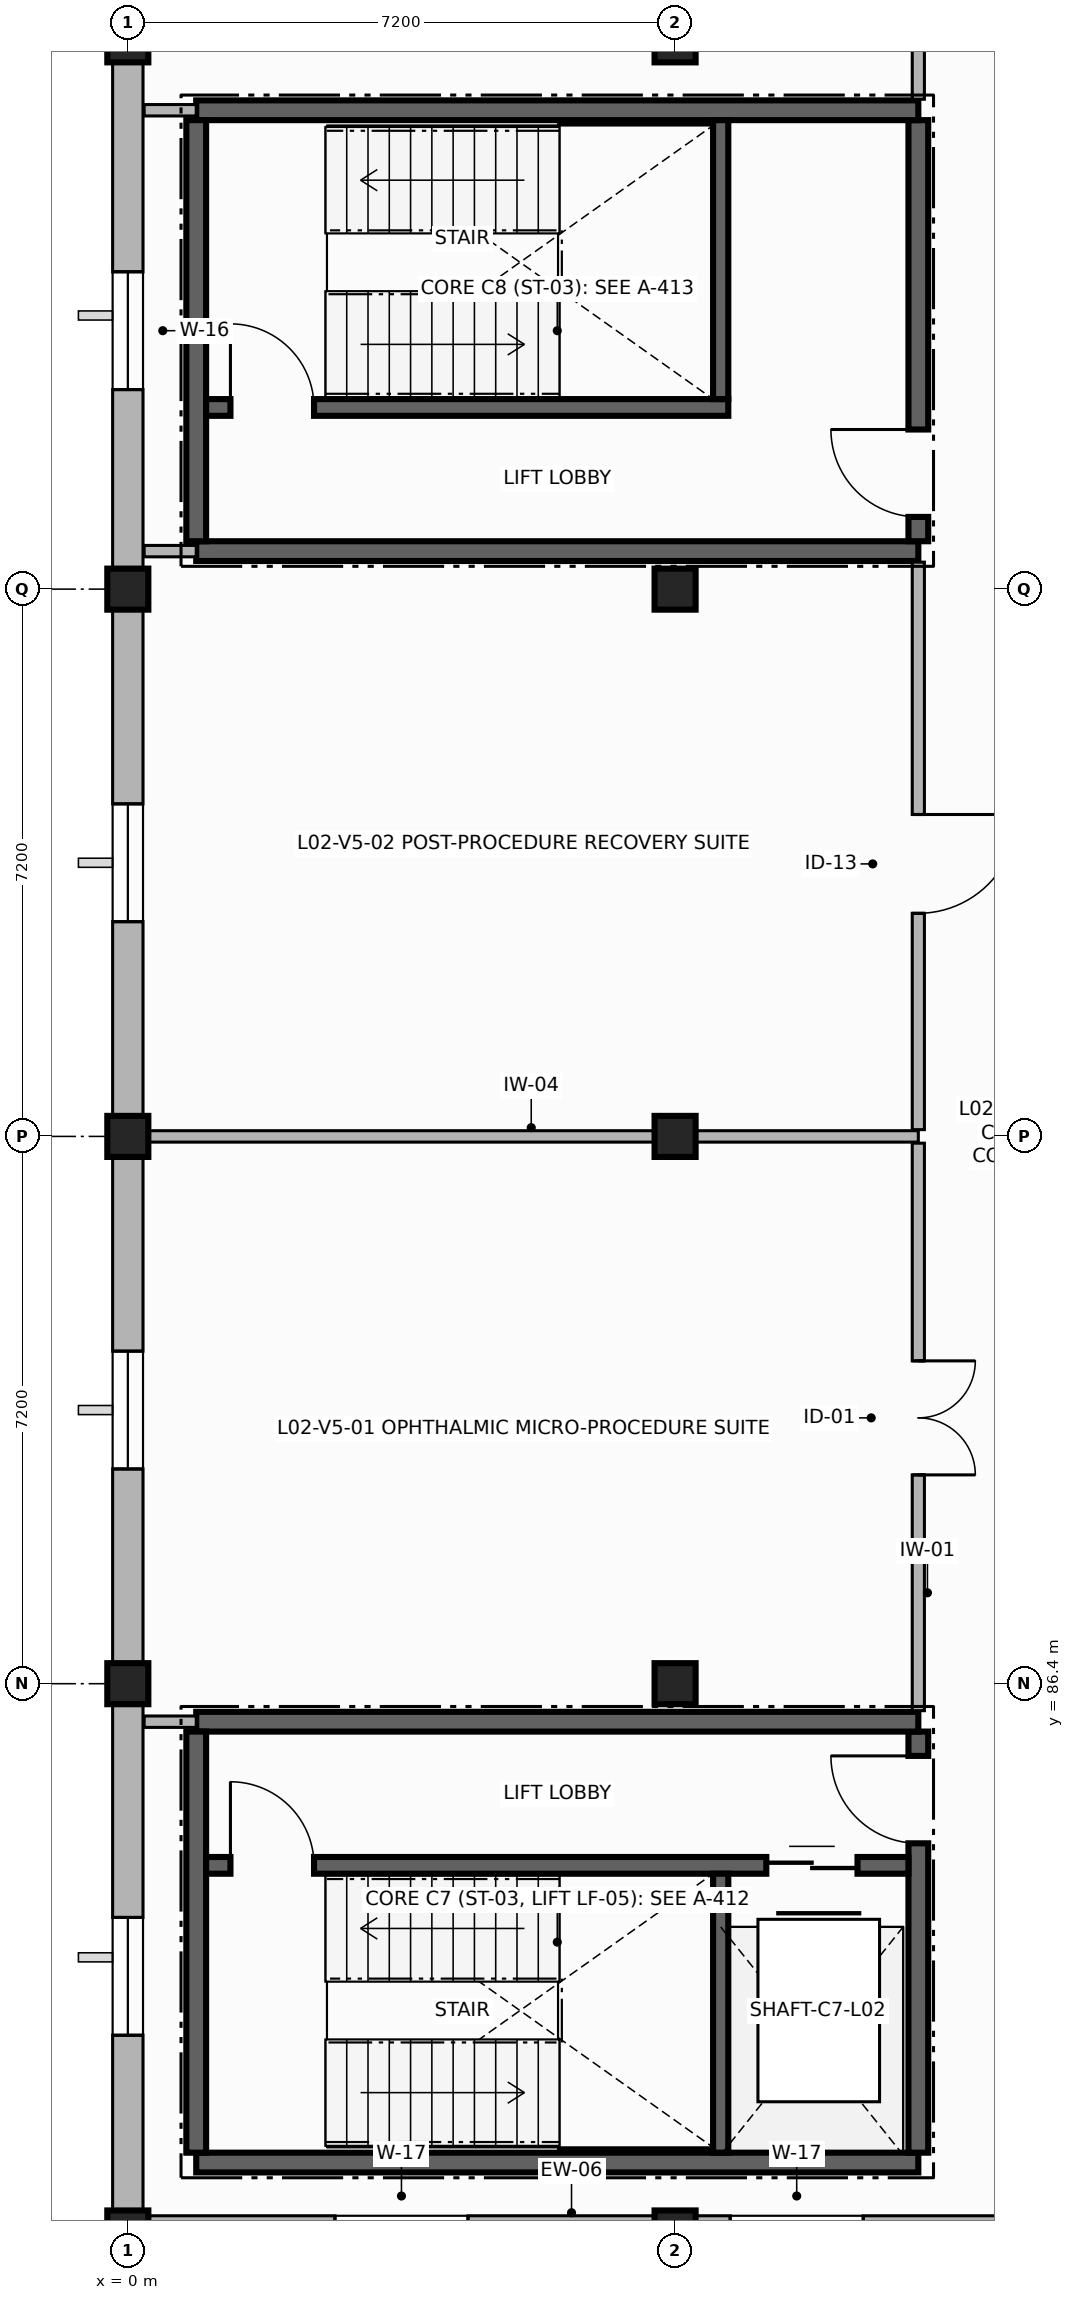
"""IFC4 building model, lengths in metres.
Left out: names, types, materials, properties, quantities, classifications, styles, units other than length and angle.
Written with IfcOpenShell. Run it as: python <this file> out.ifc"""

import sys

from ifc_helpers import new_model, si_unit, direction, frame, frame_2d, origin, origin_2d, place, context, subcontext, project, spatial, rectangle, extrude, element, fill, save


model = new_model("IFC4")
c1 = context("Model", 3, precision=1e-05, world=origin(), true_north=direction((0.0, 1.0)))
c2 = subcontext(c1, "Body", "Model", "MODEL_VIEW")
j1 = project(units=[si_unit("LENGTHUNIT", "METRE"), si_unit("PLANEANGLEUNIT", "RADIAN")], contexts=[c1])
p1 = place(None, origin())
s1 = spatial("IfcSite", under=j1, at=p1, CompositionType="ELEMENT")
p2 = place(p1, origin())
s2 = spatial("IfcBuilding", under=s1, at=p2, CompositionType="ELEMENT")
p3 = place(p2, frame((0.0, 0.0, 8.4)))
s3 = spatial("IfcBuildingStorey", under=s2, at=p3, CompositionType="ELEMENT", Elevation=8.4)
for number, where, z_axis, x_axis in (
    (1, (0.0, 79.2, 0.0), (0.0, 0.0, 1.0), (1.0, 0.0, 0.0)),
    (2, (0.0, 86.4, 0.0), (0.0, 0.0, 1.0), (1.0, 0.0, 0.0)),
    (3, (0.0, 93.6, 0.0), (0.0, 0.0, 1.0), (1.0, 0.0, 0.0)),
    (4, (0.0, 100.8, 0.0), (0.0, 0.0, 1.0), (1.0, 0.0, 0.0)),
    (5, (0.0, 108.0, 0.0), (0.0, 0.0, 1.0), (1.0, 0.0, 0.0)),
    (6, (7.2, 79.2, 0.0), (0.0, 0.0, 1.0), (1.0, 0.0, 0.0)),
    (7, (7.2, 86.4, 0.0), (0.0, 0.0, 1.0), (1.0, 0.0, 0.0)),
    (8, (7.2, 93.6, 0.0), (0.0, 0.0, 1.0), (1.0, 0.0, 0.0)),
    (9, (7.2, 100.8, 0.0), (0.0, 0.0, 1.0), (1.0, 0.0, 0.0)),
    (10, (7.2, 108.0, 0.0), (0.0, 0.0, 1.0), (1.0, 0.0, 0.0)),
):
    element("IfcColumn", number, at=place(p3, frame(where, z_axis=z_axis, x_axis=x_axis)), inside=s3, PredefinedType="COLUMN", context=c2, shape_type="SweptSolid", body=[
        extrude(rectangle(XDim=0.54, YDim=0.54, at=origin_2d()), origin(), (0.0, 0.0, 1.0), 3.59),
    ])
p4 = place(p3, frame((0.0, 79.2, 0.0), z_axis=(0.0, 0.0, 1.0), x_axis=(1.0, 0.0, 0.0)))
e11 = element("IfcWall", 11, at=p4, inside=s3, PredefinedType="SOLIDWALL", context=c2, shape_type="SweptSolid", body=[
    extrude(rectangle(XDim=7.2, YDim=0.4, at=frame_2d((3.6, 0.0))), origin(), (0.0, 0.0, 1.0), 2.92),
])
p5 = place(p4, frame((2.725, 0.0, 0.9)))
e12 = element("IfcOpeningElement", 12, at=p5, cuts=e11, PredefinedType="OPENING", context=c2, shape_type="SweptSolid", body=[
    extrude(rectangle(XDim=1.75, YDim=1.8, at=frame_2d((0.875, 0.9))), frame((0.0, 0.21, 0.0), z_axis=(0.0, -1.0, 0.0), x_axis=(1.0, 0.0, 0.0)), (0.0, 0.0, 1.0), 0.42),
])
p6 = place(p3, frame((7.2, 79.2, 0.0), z_axis=(0.0, 0.0, 1.0), x_axis=(1.0, 0.0, 0.0)))
e13 = element("IfcWall", 13, at=p6, inside=s3, PredefinedType="SOLIDWALL", context=c2, shape_type="SweptSolid", body=[
    extrude(rectangle(XDim=7.2, YDim=0.4, at=frame_2d((3.6, 0.0))), origin(), (0.0, 0.0, 1.0), 2.92),
])
p7 = place(p6, frame((0.725, 0.0, 0.9)))
e14 = element("IfcOpeningElement", 14, at=p7, cuts=e13, PredefinedType="OPENING", context=c2, shape_type="SweptSolid", body=[
    extrude(rectangle(XDim=1.75, YDim=1.8, at=frame_2d((0.875, 0.9))), frame((0.0, 0.21, 0.0), z_axis=(0.0, -1.0, 0.0), x_axis=(1.0, 0.0, 0.0)), (0.0, 0.0, 1.0), 0.42),
])
p8 = place(p3, frame((0.0, 108.0, 0.0), z_axis=(0.0, 0.0, 1.0), x_axis=(0.0, -1.0, 0.0)))
e15 = element("IfcWall", 15, at=p8, inside=s3, PredefinedType="SOLIDWALL", context=c2, shape_type="SweptSolid", body=[
    extrude(rectangle(XDim=7.2, YDim=0.4, at=frame_2d((3.6, 0.0))), origin(), (0.0, 0.0, 1.0), 2.92),
])
p9 = place(p8, frame((3.025, 0.0, 0.9)))
e16 = element("IfcOpeningElement", 16, at=p9, cuts=e15, PredefinedType="OPENING", context=c2, shape_type="SweptSolid", body=[
    extrude(rectangle(XDim=1.55, YDim=1.8, at=frame_2d((0.775, 0.9))), frame((0.0, 0.21, 0.0), z_axis=(0.0, -1.0, 0.0), x_axis=(1.0, 0.0, 0.0)), (0.0, 0.0, 1.0), 0.42),
])
p10 = place(p3, frame((0.0, 100.8, 0.0), z_axis=(0.0, 0.0, 1.0), x_axis=(0.0, -1.0, 0.0)))
e17 = element("IfcWall", 17, at=p10, inside=s3, PredefinedType="SOLIDWALL", context=c2, shape_type="SweptSolid", body=[
    extrude(rectangle(XDim=7.2, YDim=0.4, at=frame_2d((3.6, 0.0))), origin(), (0.0, 0.0, 1.0), 2.92),
])
p11 = place(p10, frame((2.825, 0.0, 0.9)))
e18 = element("IfcOpeningElement", 18, at=p11, cuts=e17, PredefinedType="OPENING", context=c2, shape_type="SweptSolid", body=[
    extrude(rectangle(XDim=1.55, YDim=1.8, at=frame_2d((0.775, 0.9))), frame((0.0, 0.21, 0.0), z_axis=(0.0, -1.0, 0.0), x_axis=(1.0, 0.0, 0.0)), (0.0, 0.0, 1.0), 0.42),
])
p12 = place(p3, frame((0.0, 93.6, 0.0), z_axis=(0.0, 0.0, 1.0), x_axis=(0.0, -1.0, 0.0)))
e19 = element("IfcWall", 19, at=p12, inside=s3, PredefinedType="SOLIDWALL", context=c2, shape_type="SweptSolid", body=[
    extrude(rectangle(XDim=7.2, YDim=0.4, at=frame_2d((3.6, 0.0))), origin(), (0.0, 0.0, 1.0), 2.92),
])
p13 = place(p12, frame((2.825, 0.0, 0.9)))
e20 = element("IfcOpeningElement", 20, at=p13, cuts=e19, PredefinedType="OPENING", context=c2, shape_type="SweptSolid", body=[
    extrude(rectangle(XDim=1.55, YDim=1.8, at=frame_2d((0.775, 0.9))), frame((0.0, 0.21, 0.0), z_axis=(0.0, -1.0, 0.0), x_axis=(1.0, 0.0, 0.0)), (0.0, 0.0, 1.0), 0.42),
])
p14 = place(p3, frame((0.0, 86.4, 0.0), z_axis=(0.0, 0.0, 1.0), x_axis=(0.0, -1.0, 0.0)))
e21 = element("IfcWall", 21, at=p14, inside=s3, PredefinedType="SOLIDWALL", context=c2, shape_type="SweptSolid", body=[
    extrude(rectangle(XDim=7.2, YDim=0.4, at=frame_2d((3.6, 0.0))), origin(), (0.0, 0.0, 1.0), 2.92),
])
p15 = place(p14, frame((3.075, 0.0, 0.9)))
e22 = element("IfcOpeningElement", 22, at=p15, cuts=e21, PredefinedType="OPENING", context=c2, shape_type="SweptSolid", body=[
    extrude(rectangle(XDim=1.55, YDim=1.8, at=frame_2d((0.775, 0.9))), frame((0.0, 0.21, 0.0), z_axis=(0.0, -1.0, 0.0), x_axis=(1.0, 0.0, 0.0)), (0.0, 0.0, 1.0), 0.42),
])
p16 = place(p3, frame((0.9, 80.1, 0.0), z_axis=(0.0, 0.0, 1.0), x_axis=(1.0, 0.0, 0.0)))
e23 = element("IfcWall", 23, at=p16, inside=s3, PredefinedType="SHEAR", context=c2, shape_type="SweptSolid", body=[
    extrude(rectangle(XDim=9.5, YDim=0.26, at=frame_2d((4.75, 0.0))), origin(), (0.0, 0.0, 1.0), 3.59),
])
p17 = place(p3, frame((10.4, 80.23, 0.0), z_axis=(0.0, 0.0, 1.0), x_axis=(0.0, 1.0, 0.0)))
e24 = element("IfcWall", 24, at=p17, inside=s3, PredefinedType="SHEAR", context=c2, shape_type="SweptSolid", body=[
    extrude(rectangle(XDim=5.54, YDim=0.26, at=frame_2d((2.77, 0.0))), origin(), (0.0, 0.0, 1.0), 3.59),
])
p18 = place(p17, frame((4.07, 0.0, 0.0)))
e25 = element("IfcOpeningElement", 25, at=p18, cuts=e24, PredefinedType="OPENING", context=c2, shape_type="SweptSolid", body=[
    extrude(rectangle(XDim=1.15, YDim=2.2, at=frame_2d((0.575, 1.1))), frame((0.0, 0.14, 0.0), z_axis=(0.0, -1.0, 0.0), x_axis=(1.0, 0.0, 0.0)), (0.0, 0.0, 1.0), 0.28),
])
p19 = place(p3, frame((10.4, 85.9, 0.0), z_axis=(0.0, 0.0, 1.0), x_axis=(-1.0, 0.0, 0.0)))
e26 = element("IfcWall", 26, at=p19, inside=s3, PredefinedType="SHEAR", context=c2, shape_type="SweptSolid", body=[
    extrude(rectangle(XDim=9.5, YDim=0.26, at=frame_2d((4.75, 0.0))), origin(), (0.0, 0.0, 1.0), 3.59),
])
p20 = place(p3, frame((0.9, 85.77, 0.0), z_axis=(0.0, 0.0, 1.0), x_axis=(0.0, -1.0, 0.0)))
e27 = element("IfcWall", 27, at=p20, inside=s3, PredefinedType="SHEAR", context=c2, shape_type="SweptSolid", body=[
    extrude(rectangle(XDim=5.54, YDim=0.26, at=frame_2d((2.77, 0.0))), origin(), (0.0, 0.0, 1.0), 3.59),
])
p21 = place(p3, frame((1.03, 84.01, 0.0), z_axis=(0.0, 0.0, 1.0), x_axis=(1.0, 0.0, 0.0)))
e28 = element("IfcWall", 28, at=p21, inside=s3, PredefinedType="SHEAR", context=c2, shape_type="SweptSolid", body=[
    extrude(rectangle(XDim=9.24, YDim=0.22, at=frame_2d((4.62, 0.0))), origin(), (0.0, 0.0, 1.0), 3.59),
])
p22 = place(p21, frame((0.32, 0.0, 0.0)))
e29 = element("IfcOpeningElement", 29, at=p22, cuts=e28, PredefinedType="OPENING", context=c2, shape_type="SweptSolid", body=[
    extrude(rectangle(XDim=1.1, YDim=2.15, at=frame_2d((0.55, 1.075))), frame((0.0, 0.12, 0.0), z_axis=(0.0, -1.0, 0.0), x_axis=(1.0, 0.0, 0.0)), (0.0, 0.0, 1.0), 0.24),
])
p23 = place(p21, frame((7.37, 0.0, 0.0)))
e30 = element("IfcOpeningElement", 30, at=p23, cuts=e28, PredefinedType="OPENING", context=c2, shape_type="SweptSolid", body=[
    extrude(rectangle(XDim=1.2, YDim=2.2, at=frame_2d((0.6, 1.1))), frame((0.0, 0.12, 0.0), z_axis=(0.0, -1.0, 0.0), x_axis=(1.0, 0.0, 0.0)), (0.0, 0.0, 1.0), 0.24),
])
p24 = place(p3, frame((7.8, 80.23, 0.0), z_axis=(0.0, 0.0, 1.0), x_axis=(0.0, 1.0, 0.0)))
e31 = element("IfcWall", 31, at=p24, inside=s3, PredefinedType="SHEAR", context=c2, shape_type="SweptSolid", body=[
    extrude(rectangle(XDim=3.67, YDim=0.2, at=frame_2d((1.835, 0.0))), origin(), (0.0, 0.0, 1.0), 3.59),
])
p25 = place(p3, frame((0.9, 101.3, 0.0), z_axis=(0.0, 0.0, 1.0), x_axis=(1.0, 0.0, 0.0)))
e32 = element("IfcWall", 32, at=p25, inside=s3, PredefinedType="SHEAR", context=c2, shape_type="SweptSolid", body=[
    extrude(rectangle(XDim=9.5, YDim=0.26, at=frame_2d((4.75, 0.0))), origin(), (0.0, 0.0, 1.0), 3.59),
])
p26 = place(p3, frame((10.4, 101.43, 0.0), z_axis=(0.0, 0.0, 1.0), x_axis=(0.0, 1.0, 0.0)))
e33 = element("IfcWall", 33, at=p26, inside=s3, PredefinedType="SHEAR", context=c2, shape_type="SweptSolid", body=[
    extrude(rectangle(XDim=5.54, YDim=0.26, at=frame_2d((2.77, 0.0))), origin(), (0.0, 0.0, 1.0), 3.59),
])
p27 = place(p26, frame((0.32, 0.0, 0.0)))
e34 = element("IfcOpeningElement", 34, at=p27, cuts=e33, PredefinedType="OPENING", context=c2, shape_type="SweptSolid", body=[
    extrude(rectangle(XDim=1.15, YDim=2.2, at=frame_2d((0.575, 1.1))), frame((0.0, 0.14, 0.0), z_axis=(0.0, -1.0, 0.0), x_axis=(1.0, 0.0, 0.0)), (0.0, 0.0, 1.0), 0.28),
])
p28 = place(p3, frame((10.4, 107.1, 0.0), z_axis=(0.0, 0.0, 1.0), x_axis=(-1.0, 0.0, 0.0)))
e35 = element("IfcWall", 35, at=p28, inside=s3, PredefinedType="SHEAR", context=c2, shape_type="SweptSolid", body=[
    extrude(rectangle(XDim=9.5, YDim=0.26, at=frame_2d((4.75, 0.0))), origin(), (0.0, 0.0, 1.0), 3.59),
])
p29 = place(p3, frame((0.9, 106.97, 0.0), z_axis=(0.0, 0.0, 1.0), x_axis=(0.0, -1.0, 0.0)))
e36 = element("IfcWall", 36, at=p29, inside=s3, PredefinedType="SHEAR", context=c2, shape_type="SweptSolid", body=[
    extrude(rectangle(XDim=5.54, YDim=0.26, at=frame_2d((2.77, 0.0))), origin(), (0.0, 0.0, 1.0), 3.59),
])
p30 = place(p3, frame((1.03, 103.19, 0.0), z_axis=(0.0, 0.0, 1.0), x_axis=(1.0, 0.0, 0.0)))
e37 = element("IfcWall", 37, at=p30, inside=s3, PredefinedType="SHEAR", context=c2, shape_type="SweptSolid", body=[
    extrude(rectangle(XDim=6.87, YDim=0.22, at=frame_2d((3.435, 0.0))), origin(), (0.0, 0.0, 1.0), 3.59),
])
p31 = place(p30, frame((0.32, 0.0, 0.0)))
e38 = element("IfcOpeningElement", 38, at=p31, cuts=e37, PredefinedType="OPENING", context=c2, shape_type="SweptSolid", body=[
    extrude(rectangle(XDim=1.1, YDim=2.15, at=frame_2d((0.55, 1.075))), frame((0.0, 0.12, 0.0), z_axis=(0.0, -1.0, 0.0), x_axis=(1.0, 0.0, 0.0)), (0.0, 0.0, 1.0), 0.24),
])
p32 = place(p3, frame((7.8, 103.3, 0.0), z_axis=(0.0, 0.0, 1.0), x_axis=(0.0, 1.0, 0.0)))
e39 = element("IfcWall", 39, at=p32, inside=s3, PredefinedType="SHEAR", context=c2, shape_type="SweptSolid", body=[
    extrude(rectangle(XDim=3.67, YDim=0.2, at=frame_2d((1.835, 0.0))), origin(), (0.0, 0.0, 1.0), 3.59),
])
p33 = place(p3, frame((0.215, 93.6, 0.0), z_axis=(0.0, 0.0, 1.0), x_axis=(1.0, 0.0, 0.0)))
e40 = element("IfcWall", 40, at=p33, inside=s3, PredefinedType="PARTITIONING", context=c2, shape_type="SweptSolid", body=[
    extrude(rectangle(XDim=10.185, YDim=0.15, at=frame_2d((5.092, 0.0))), origin(), (0.0, 0.0, 1.0), 2.9),
])
p34 = place(p3, frame((10.4, 93.511, 0.0), z_axis=(0.0, 0.0, 1.0), x_axis=(0.0, -1.0, 0.0)))
e41 = element("IfcWall", 41, at=p34, inside=s3, PredefinedType="PARTITIONING", context=c2, shape_type="SweptSolid", body=[
    extrude(rectangle(XDim=7.466, YDim=0.16, at=frame_2d((3.733, 0.0))), origin(), (0.0, 0.0, 1.0), 2.9),
])
p35 = place(p34, frame((2.864, 0.0, 0.0)))
e42 = element("IfcOpeningElement", 42, at=p35, cuts=e41, PredefinedType="OPENING", context=c2, shape_type="SweptSolid", body=[
    extrude(rectangle(XDim=1.5, YDim=2.3, at=frame_2d((0.75, 1.15))), frame((0.0, 0.09, 0.0), z_axis=(0.0, -1.0, 0.0), x_axis=(1.0, 0.0, 0.0)), (0.0, 0.0, 1.0), 0.18),
])
for number, where, z_axis, x_axis in (
    (43, (0.9, 85.9, 0.0), (0.0, 0.0, 1.0), (-1.0, 0.0, 0.0)),
    (44, (0.215, 101.3, 0.0), (0.0, 0.0, 1.0), (1.0, 0.0, 0.0)),
):
    element("IfcWall", number, at=place(p3, frame(where, z_axis=z_axis, x_axis=x_axis)), inside=s3, PredefinedType="PARTITIONING", context=c2, shape_type="SweptSolid", body=[
        extrude(rectangle(XDim=0.685, YDim=0.15, at=frame_2d((0.342, 0.0))), origin(), (0.0, 0.0, 1.0), 2.9),
    ])
p36 = place(p3, frame((10.4, 101.155, 0.0), z_axis=(0.0, 0.0, 1.0), x_axis=(0.0, -1.0, 0.0)))
e45 = element("IfcWall", 45, at=p36, inside=s3, PredefinedType="PARTITIONING", context=c2, shape_type="SweptSolid", body=[
    extrude(rectangle(XDim=7.466, YDim=0.16, at=frame_2d((3.733, 0.0))), origin(), (0.0, 0.0, 1.0), 2.9),
])
p37 = place(p36, frame((3.32, 0.0, 0.0)))
e46 = element("IfcOpeningElement", 46, at=p37, cuts=e45, PredefinedType="OPENING", context=c2, shape_type="SweptSolid", body=[
    extrude(rectangle(XDim=1.3, YDim=2.25, at=frame_2d((0.65, 1.125))), frame((0.0, 0.09, 0.0), z_axis=(0.0, -1.0, 0.0), x_axis=(1.0, 0.0, 0.0)), (0.0, 0.0, 1.0), 0.18),
])
p38 = place(p3, frame((10.4, 112.585, 0.0), z_axis=(0.0, 0.0, 1.0), x_axis=(0.0, -1.0, 0.0)))
e47 = element("IfcWall", 47, at=p38, inside=s3, PredefinedType="PARTITIONING", context=c2, shape_type="SweptSolid", body=[
    extrude(rectangle(XDim=5.34, YDim=0.16, at=frame_2d((2.67, 0.0))), origin(), (0.0, 0.0, 1.0), 2.9),
])
p39 = place(p38, frame((1.366, 0.0, 0.0)))
e48 = element("IfcOpeningElement", 48, at=p39, cuts=e47, PredefinedType="OPENING", context=c2, shape_type="SweptSolid", body=[
    extrude(rectangle(XDim=1.5, YDim=2.3, at=frame_2d((0.75, 1.15))), frame((0.0, 0.09, 0.0), z_axis=(0.0, -1.0, 0.0), x_axis=(1.0, 0.0, 0.0)), (0.0, 0.0, 1.0), 0.18),
])
p40 = place(p3, frame((0.9, 107.1, 0.0), z_axis=(0.0, 0.0, 1.0), x_axis=(-1.0, 0.0, 0.0)))
e49 = element("IfcWall", 49, at=p40, inside=s3, PredefinedType="PARTITIONING", context=c2, shape_type="SweptSolid", body=[
    extrude(rectangle(XDim=0.685, YDim=0.15, at=frame_2d((0.342, 0.0))), origin(), (0.0, 0.0, 1.0), 2.9),
])
p41 = place(p9, origin())
e50 = element("IfcWindow", 50, at=p41, inside=s3, PartitioningType="SINGLE_PANEL", PredefinedType="WINDOW", context=c2, shape_type="SweptSolid", body=[
    extrude(rectangle(XDim=1.55, YDim=1.8, at=frame_2d((0.775, 0.9))), frame((0.0, 0.03, 0.0), z_axis=(0.0, -1.0, 0.0), x_axis=(1.0, 0.0, 0.0)), (0.0, 0.0, 1.0), 0.06),
])
fill(e16, e50)
p42 = place(p11, origin())
e51 = element("IfcWindow", 51, at=p42, inside=s3, PartitioningType="SINGLE_PANEL", PredefinedType="WINDOW", context=c2, shape_type="SweptSolid", body=[
    extrude(rectangle(XDim=1.55, YDim=1.8, at=frame_2d((0.775, 0.9))), frame((0.0, 0.03, 0.0), z_axis=(0.0, -1.0, 0.0), x_axis=(1.0, 0.0, 0.0)), (0.0, 0.0, 1.0), 0.06),
])
fill(e18, e51)
p43 = place(p13, origin())
e52 = element("IfcWindow", 52, at=p43, inside=s3, PartitioningType="SINGLE_PANEL", PredefinedType="WINDOW", context=c2, shape_type="SweptSolid", body=[
    extrude(rectangle(XDim=1.55, YDim=1.8, at=frame_2d((0.775, 0.9))), frame((0.0, 0.03, 0.0), z_axis=(0.0, -1.0, 0.0), x_axis=(1.0, 0.0, 0.0)), (0.0, 0.0, 1.0), 0.06),
])
fill(e20, e52)
p44 = place(p15, origin())
e53 = element("IfcWindow", 53, at=p44, inside=s3, PartitioningType="SINGLE_PANEL", PredefinedType="WINDOW", context=c2, shape_type="SweptSolid", body=[
    extrude(rectangle(XDim=1.55, YDim=1.8, at=frame_2d((0.775, 0.9))), frame((0.0, 0.03, 0.0), z_axis=(0.0, -1.0, 0.0), x_axis=(1.0, 0.0, 0.0)), (0.0, 0.0, 1.0), 0.06),
])
fill(e22, e53)
p45 = place(p22, origin())
e54 = element("IfcDoor", 54, at=p45, inside=s3, OperationType="SINGLE_SWING_LEFT", PredefinedType="DOOR", context=c2, shape_type="SweptSolid", body=[
    extrude(rectangle(XDim=1.1, YDim=2.15, at=frame_2d((0.55, 1.075))), frame((0.0, 0.025, 0.0), z_axis=(0.0, -1.0, 0.0), x_axis=(1.0, 0.0, 0.0)), (0.0, 0.0, 1.0), 0.05),
])
fill(e29, e54)
p46 = place(p23, origin())
e55 = element("IfcDoor", 55, at=p46, inside=s3, OperationType="DOUBLE_DOOR_SLIDING", PredefinedType="DOOR", context=c2, shape_type="SweptSolid", body=[
    extrude(rectangle(XDim=1.2, YDim=2.2, at=frame_2d((0.6, 1.1))), frame((0.0, 0.025, 0.0), z_axis=(0.0, -1.0, 0.0), x_axis=(1.0, 0.0, 0.0)), (0.0, 0.0, 1.0), 0.05),
])
fill(e30, e55)
p47 = place(p18, origin())
e56 = element("IfcDoor", 56, at=p47, inside=s3, OperationType="SINGLE_SWING_RIGHT", PredefinedType="DOOR", context=c2, shape_type="SweptSolid", body=[
    extrude(rectangle(XDim=1.15, YDim=2.2, at=frame_2d((0.575, 1.1))), frame((0.0, 0.025, 0.0), z_axis=(0.0, -1.0, 0.0), x_axis=(1.0, 0.0, 0.0)), (0.0, 0.0, 1.0), 0.05),
])
fill(e25, e56)
p48 = place(p31, origin())
e57 = element("IfcDoor", 57, at=p48, inside=s3, OperationType="SINGLE_SWING_LEFT", PredefinedType="DOOR", context=c2, shape_type="SweptSolid", body=[
    extrude(rectangle(XDim=1.1, YDim=2.15, at=frame_2d((0.55, 1.075))), frame((0.0, 0.025, 0.0), z_axis=(0.0, -1.0, 0.0), x_axis=(1.0, 0.0, 0.0)), (0.0, 0.0, 1.0), 0.05),
])
fill(e38, e57)
p49 = place(p27, origin())
e58 = element("IfcDoor", 58, at=p49, inside=s3, OperationType="SINGLE_SWING_RIGHT", PredefinedType="DOOR", context=c2, shape_type="SweptSolid", body=[
    extrude(rectangle(XDim=1.15, YDim=2.2, at=frame_2d((0.575, 1.1))), frame((0.0, 0.025, 0.0), z_axis=(0.0, -1.0, 0.0), x_axis=(1.0, 0.0, 0.0)), (0.0, 0.0, 1.0), 0.05),
])
fill(e34, e58)
p50 = place(p35, origin())
e59 = element("IfcDoor", 59, at=p50, inside=s3, OperationType="DOUBLE_DOOR_SINGLE_SWING", PredefinedType="DOOR", context=c2, shape_type="SweptSolid", body=[
    extrude(rectangle(XDim=1.5, YDim=2.3, at=frame_2d((0.75, 1.15))), frame((0.0, 0.025, 0.0), z_axis=(0.0, -1.0, 0.0), x_axis=(1.0, 0.0, 0.0)), (0.0, 0.0, 1.0), 0.05),
])
fill(e42, e59)
p51 = place(p37, origin())
e60 = element("IfcDoor", 60, at=p51, inside=s3, OperationType="SINGLE_SWING_LEFT", PredefinedType="DOOR", context=c2, shape_type="SweptSolid", body=[
    extrude(rectangle(XDim=1.3, YDim=2.25, at=frame_2d((0.65, 1.125))), frame((0.0, 0.025, 0.0), z_axis=(0.0, -1.0, 0.0), x_axis=(1.0, 0.0, 0.0)), (0.0, 0.0, 1.0), 0.05),
])
fill(e46, e60)
save(model, sys.argv[1])
